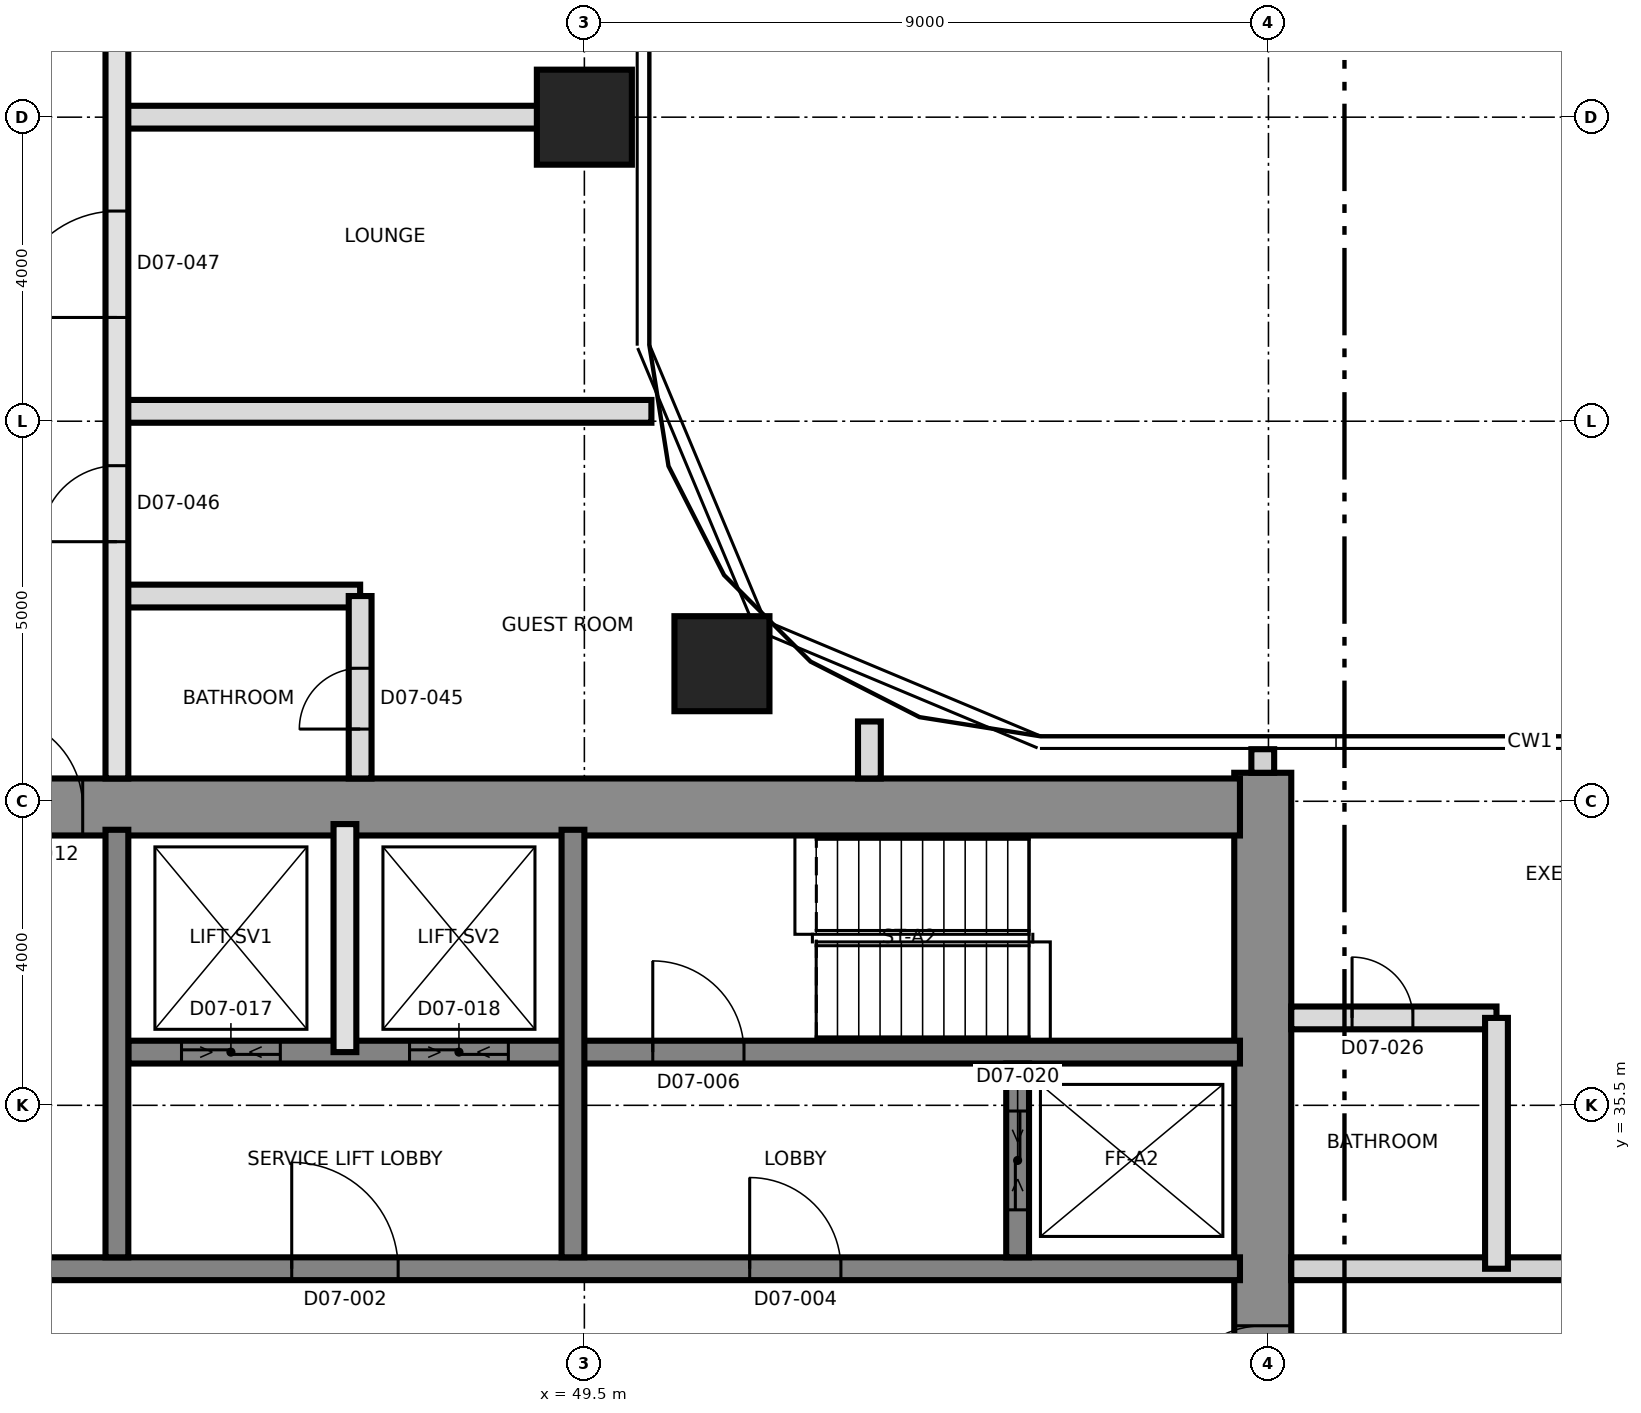
"""IFC4 building model, lengths in metres.
Left out: names, types, materials, properties, quantities, classifications, styles, units other than length and angle.
Written with IfcOpenShell. Run it as: python <this file> out.ifc"""

import sys

from ifc_helpers import new_model, si_unit, direction, frame, frame_2d, origin, origin_2d, place, context, subcontext, project, spatial, rectangle, extrude, element, fill, save


model = new_model("IFC4")
c1 = context("Model", 3, precision=1e-05, world=origin(), true_north=direction((0.0, 1.0)))
c2 = subcontext(c1, "Body", "Model", "MODEL_VIEW")
j1 = project(units=[si_unit("LENGTHUNIT", "METRE"), si_unit("PLANEANGLEUNIT", "RADIAN")], contexts=[c1])
p1 = place(None, origin())
s1 = spatial("IfcSite", under=j1, at=p1, CompositionType="ELEMENT")
p2 = place(p1, origin())
s2 = spatial("IfcBuilding", under=s1, at=p2, CompositionType="ELEMENT")
p3 = place(p2, frame((0.0, 0.0, 90.8)))
s3 = spatial("IfcBuildingStorey", under=s2, at=p3, CompositionType="ELEMENT", Elevation=90.8)
p4 = place(p3, frame((58.425, 21.125, 0.0), z_axis=(0.0, 0.0, 1.0), x_axis=(0.0, 1.0, 0.0)))
e1 = element("IfcWall", 1, at=p4, inside=s3, PredefinedType="SHEAR", context=c2, shape_type="SweptSolid", body=[
    extrude(rectangle(XDim=18.75, YDim=0.75, at=frame_2d((9.375, 0.0))), origin(), (0.0, 0.0, 1.0), 3.7),
])
p5 = place(p4, frame((10.275, 0.0, 0.0)))
e2 = element("IfcOpeningElement", 2, at=p5, cuts=e1, PredefinedType="OPENING", context=c2, shape_type="SweptSolid", body=[
    extrude(rectangle(XDim=1.2, YDim=2.1, at=frame_2d((0.6, 1.05))), frame((0.0, 0.385, 0.0), z_axis=(0.0, -1.0, 0.0), x_axis=(1.0, 0.0, 0.0)), (0.0, 0.0, 1.0), 0.77),
])
p6 = place(p3, frame((31.125, 39.425, 0.0), z_axis=(0.0, 0.0, 1.0), x_axis=(1.0, 0.0, 0.0)))
e3 = element("IfcWall", 3, at=p6, inside=s3, PredefinedType="SHEAR", context=c2, shape_type="SweptSolid", body=[
    extrude(rectangle(XDim=27.0, YDim=0.75, at=frame_2d((13.5, 0.0))), origin(), (0.0, 0.0, 1.0), 3.7),
])
p7 = place(p6, frame((10.575, 0.0, 0.0)))
e4 = element("IfcOpeningElement", 4, at=p7, cuts=e3, PredefinedType="OPENING", context=c2, shape_type="SweptSolid", body=[
    extrude(rectangle(XDim=1.2, YDim=2.1, at=frame_2d((0.6, 1.05))), frame((0.0, 0.385, 0.0), z_axis=(0.0, -1.0, 0.0), x_axis=(1.0, 0.0, 0.0)), (0.0, 0.0, 1.0), 0.77),
])
p8 = place(p3, frame((31.875, 33.35, 0.0), z_axis=(0.0, 0.0, 1.0), x_axis=(1.0, 0.0, 0.0)))
e5 = element("IfcWall", 5, at=p8, inside=s3, PredefinedType="SHEAR", context=c2, shape_type="SweptSolid", body=[
    extrude(rectangle(XDim=26.25, YDim=0.3, at=frame_2d((13.125, 0.0))), origin(), (0.0, 0.0, 1.0), 3.7),
])
p9 = place(p8, frame((13.775, 0.0, 0.0)))
e6 = element("IfcOpeningElement", 6, at=p9, cuts=e5, PredefinedType="OPENING", context=c2, shape_type="SweptSolid", body=[
    extrude(rectangle(XDim=1.4, YDim=2.1, at=frame_2d((0.7, 1.05))), frame((0.0, 0.16, 0.0), z_axis=(0.0, -1.0, 0.0), x_axis=(1.0, 0.0, 0.0)), (0.0, 0.0, 1.0), 0.32),
])
p10 = place(p8, frame((5.25, 0.0, 0.0)))
e7 = element("IfcOpeningElement", 7, at=p10, cuts=e5, PredefinedType="OPENING", context=c2, shape_type="SweptSolid", body=[
    extrude(rectangle(XDim=1.2, YDim=2.1, at=frame_2d((0.6, 1.05))), frame((0.0, 0.16, 0.0), z_axis=(0.0, -1.0, 0.0), x_axis=(1.0, 0.0, 0.0)), (0.0, 0.0, 1.0), 0.32),
])
p11 = place(p8, frame((19.8, 0.0, 0.0)))
e8 = element("IfcOpeningElement", 8, at=p11, cuts=e5, PredefinedType="OPENING", context=c2, shape_type="SweptSolid", body=[
    extrude(rectangle(XDim=1.2, YDim=2.1, at=frame_2d((0.6, 1.05))), frame((0.0, 0.16, 0.0), z_axis=(0.0, -1.0, 0.0), x_axis=(1.0, 0.0, 0.0)), (0.0, 0.0, 1.0), 0.32),
])
p12 = place(p3, frame((43.5, 36.2, 0.0), z_axis=(0.0, 0.0, 1.0), x_axis=(1.0, 0.0, 0.0)))
e9 = element("IfcWall", 9, at=p12, inside=s3, PredefinedType="SHEAR", context=c2, shape_type="SweptSolid", body=[
    extrude(rectangle(XDim=14.625, YDim=0.3, at=frame_2d((7.312, 0.0))), origin(), (0.0, 0.0, 1.0), 3.7),
])
p13 = place(p12, frame((6.9, 0.0, 0.0)))
e10 = element("IfcOpeningElement", 10, at=p13, cuts=e9, PredefinedType="OPENING", context=c2, shape_type="SweptSolid", body=[
    extrude(rectangle(XDim=1.2, YDim=2.1, at=frame_2d((0.6, 1.05))), frame((0.0, 0.16, 0.0), z_axis=(0.0, -1.0, 0.0), x_axis=(1.0, 0.0, 0.0)), (0.0, 0.0, 1.0), 0.32),
])
p14 = place(p12, frame((0.7, 0.0, 0.0)))
e11 = element("IfcOpeningElement", 11, at=p14, cuts=e9, PredefinedType="OPENING", context=c2, shape_type="SweptSolid", body=[
    extrude(rectangle(XDim=1.3, YDim=2.4, at=frame_2d((0.65, 1.2))), frame((0.0, 0.16, 0.0), z_axis=(0.0, -1.0, 0.0), x_axis=(1.0, 0.0, 0.0)), (0.0, 0.0, 1.0), 0.32),
])
p15 = place(p12, frame((3.7, 0.0, 0.0)))
e12 = element("IfcOpeningElement", 12, at=p15, cuts=e9, PredefinedType="OPENING", context=c2, shape_type="SweptSolid", body=[
    extrude(rectangle(XDim=1.3, YDim=2.4, at=frame_2d((0.65, 1.2))), frame((0.0, 0.16, 0.0), z_axis=(0.0, -1.0, 0.0), x_axis=(1.0, 0.0, 0.0)), (0.0, 0.0, 1.0), 0.32),
])
for number, where, z_axis, x_axis in (
    (13, (43.35, 33.5, 0.0), (0.0, 0.0, 1.0), (0.0, 1.0, 0.0)),
    (14, (49.35, 33.5, 0.0), (0.0, 0.0, 1.0), (0.0, 1.0, 0.0)),
):
    element("IfcWall", number, at=place(p3, frame(where, z_axis=z_axis, x_axis=x_axis)), inside=s3, PredefinedType="SHEAR", context=c2, shape_type="SweptSolid", body=[
        extrude(rectangle(XDim=5.625, YDim=0.3, at=frame_2d((2.812, 0.0))), origin(), (0.0, 0.0, 1.0), 3.7),
    ])
p16 = place(p3, frame((55.2, 33.5, 0.0), z_axis=(0.0, 0.0, 1.0), x_axis=(0.0, 1.0, 0.0)))
e15 = element("IfcWall", 15, at=p16, inside=s3, PredefinedType="SHEAR", context=c2, shape_type="SweptSolid", body=[
    extrude(rectangle(XDim=2.55, YDim=0.3, at=frame_2d((1.275, 0.0))), origin(), (0.0, 0.0, 1.0), 3.7),
])
p17 = place(p16, frame((0.625, 0.0, 0.0)))
e16 = element("IfcOpeningElement", 16, at=p17, cuts=e15, PredefinedType="OPENING", context=c2, shape_type="SweptSolid", body=[
    extrude(rectangle(XDim=1.3, YDim=2.4, at=frame_2d((0.65, 1.2))), frame((0.0, 0.16, 0.0), z_axis=(0.0, -1.0, 0.0), x_axis=(1.0, 0.0, 0.0)), (0.0, 0.0, 1.0), 0.32),
])
for number, where, z_axis, x_axis in (
    (17, (51.31, 41.31, 0.0), (0.0, 0.0, 1.0), (1.0, 0.0, 0.0)),
    (18, (49.5, 48.5, 0.0), (0.0, 0.0, 1.0), (1.0, 0.0, 0.0)),
):
    element("IfcColumn", number, at=place(p3, frame(where, z_axis=z_axis, x_axis=x_axis)), inside=s3, PredefinedType="COLUMN", context=c2, shape_type="SweptSolid", body=[
        extrude(rectangle(XDim=1.25, YDim=1.25, at=origin_2d()), origin(), (0.0, 0.0, 1.0), 3.7),
    ])
p18 = place(p3, frame((46.35, 36.2, 0.0), z_axis=(0.0, 0.0, 1.0), x_axis=(0.0, 1.0, 0.0)))
e19 = element("IfcWall", 19, at=p18, inside=s3, PredefinedType="SOLIDWALL", context=c2, shape_type="SweptSolid", body=[
    extrude(rectangle(XDim=3.0, YDim=0.3, at=frame_2d((1.5, 0.0))), origin(), (0.0, 0.0, 1.0), 3.4),
])
p19 = place(p3, frame((58.8, 33.35, 0.0), z_axis=(0.0, 0.0, 1.0), x_axis=(1.0, 0.0, 0.0)))
e20 = element("IfcWall", 20, at=p19, inside=s3, PredefinedType="PARTITIONING", context=c2, shape_type="SweptSolid", body=[
    extrude(rectangle(XDim=26.53, YDim=0.3, at=frame_2d((13.265, 0.0))), origin(), (0.0, 0.0, 1.0), 3.4),
])
p20 = place(p19, frame((3.7, 0.0, 0.0)))
e21 = element("IfcOpeningElement", 21, at=p20, cuts=e20, PredefinedType="OPENING", context=c2, shape_type="SweptSolid", body=[
    extrude(rectangle(XDim=1.0, YDim=2.4, at=frame_2d((0.5, 1.2))), frame((0.0, 0.16, 0.0), z_axis=(0.0, -1.0, 0.0), x_axis=(1.0, 0.0, 0.0)), (0.0, 0.0, 1.0), 0.32),
])
p21 = place(p19, frame((9.85, 0.0, 0.0)))
e22 = element("IfcOpeningElement", 22, at=p21, cuts=e20, PredefinedType="OPENING", context=c2, shape_type="SweptSolid", body=[
    extrude(rectangle(XDim=1.0, YDim=2.1, at=frame_2d((0.5, 1.05))), frame((0.0, 0.16, 0.0), z_axis=(0.0, -1.0, 0.0), x_axis=(1.0, 0.0, 0.0)), (0.0, 0.0, 1.0), 0.32),
])
p22 = place(p19, frame((15.7, 0.0, 0.0)))
e23 = element("IfcOpeningElement", 23, at=p22, cuts=e20, PredefinedType="OPENING", context=c2, shape_type="SweptSolid", body=[
    extrude(rectangle(XDim=1.0, YDim=2.1, at=frame_2d((0.5, 1.05))), frame((0.0, 0.16, 0.0), z_axis=(0.0, -1.0, 0.0), x_axis=(1.0, 0.0, 0.0)), (0.0, 0.0, 1.0), 0.32),
])
p23 = place(p19, frame((21.7, 0.0, 0.0)))
e24 = element("IfcOpeningElement", 24, at=p23, cuts=e20, PredefinedType="OPENING", context=c2, shape_type="SweptSolid", body=[
    extrude(rectangle(XDim=1.0, YDim=2.4, at=frame_2d((0.5, 1.2))), frame((0.0, 0.16, 0.0), z_axis=(0.0, -1.0, 0.0), x_axis=(1.0, 0.0, 0.0)), (0.0, 0.0, 1.0), 0.32),
])
p24 = place(p3, frame((58.8, 36.65, 0.0), z_axis=(0.0, 0.0, 1.0), x_axis=(1.0, 0.0, 0.0)))
e25 = element("IfcWall", 25, at=p24, inside=s3, PredefinedType="PARTITIONING", context=c2, shape_type="SweptSolid", body=[
    extrude(rectangle(XDim=2.7, YDim=0.3, at=frame_2d((1.35, 0.0))), origin(), (0.0, 0.0, 1.0), 3.4),
])
p25 = place(p24, frame((0.8, 0.0, 0.0)))
e26 = element("IfcOpeningElement", 26, at=p25, cuts=e25, PredefinedType="OPENING", context=c2, shape_type="SweptSolid", body=[
    extrude(rectangle(XDim=0.8, YDim=2.1, at=frame_2d((0.4, 1.05))), frame((0.0, 0.16, 0.0), z_axis=(0.0, -1.0, 0.0), x_axis=(1.0, 0.0, 0.0)), (0.0, 0.0, 1.0), 0.32),
])
p26 = place(p3, frame((43.35, 42.2, 0.0), z_axis=(0.0, 0.0, 1.0), x_axis=(1.0, 0.0, 0.0)))
e27 = element("IfcWall", 27, at=p26, inside=s3, PredefinedType="PARTITIONING", context=c2, shape_type="SweptSolid", body=[
    extrude(rectangle(XDim=3.2, YDim=0.3, at=frame_2d((1.6, 0.0))), origin(), (0.0, 0.0, 1.0), 3.4),
])
p27 = place(p3, frame((43.35, 44.63, 0.0), z_axis=(0.0, 0.0, 1.0), x_axis=(1.0, 0.0, 0.0)))
e28 = element("IfcWall", 28, at=p27, inside=s3, PredefinedType="PARTITIONING", context=c2, shape_type="SweptSolid", body=[
    extrude(rectangle(XDim=7.032, YDim=0.3, at=frame_2d((3.516, 0.0))), origin(), (0.0, 0.0, 1.0), 3.4),
])
p28 = place(p3, frame((43.35, 48.5, 0.0), z_axis=(0.0, 0.0, 1.0), x_axis=(1.0, 0.0, 0.0)))
e29 = element("IfcWall", 29, at=p28, inside=s3, PredefinedType="PARTITIONING", context=c2, shape_type="SweptSolid", body=[
    extrude(rectangle(XDim=6.655, YDim=0.3, at=frame_2d((3.327, 0.0))), origin(), (0.0, 0.0, 1.0), 3.4),
])
p29 = place(p3, frame((43.35, 39.8, 0.0), z_axis=(0.0, 0.0, 1.0), x_axis=(0.0, 1.0, 0.0)))
e30 = element("IfcWall", 30, at=p29, inside=s3, PredefinedType="SOLIDWALL", context=c2, shape_type="SweptSolid", body=[
    extrude(rectangle(XDim=26.0, YDim=0.3, at=frame_2d((13.0, 0.0))), origin(), (0.0, 0.0, 1.0), 3.4),
])
p30 = place(p29, frame((3.115, 0.0, 0.0)))
e31 = element("IfcOpeningElement", 31, at=p30, cuts=e30, PredefinedType="OPENING", context=c2, shape_type="SweptSolid", body=[
    extrude(rectangle(XDim=1.0, YDim=2.1, at=frame_2d((0.5, 1.05))), frame((0.0, 0.16, 0.0), z_axis=(0.0, -1.0, 0.0), x_axis=(1.0, 0.0, 0.0)), (0.0, 0.0, 1.0), 0.32),
])
p31 = place(p29, frame((6.065, 0.0, 0.0)))
e32 = element("IfcOpeningElement", 32, at=p31, cuts=e30, PredefinedType="OPENING", context=c2, shape_type="SweptSolid", body=[
    extrude(rectangle(XDim=1.4, YDim=2.1, at=frame_2d((0.7, 1.05))), frame((0.0, 0.16, 0.0), z_axis=(0.0, -1.0, 0.0), x_axis=(1.0, 0.0, 0.0)), (0.0, 0.0, 1.0), 0.32),
])
p32 = place(p29, frame((9.835, 0.0, 0.0)))
e33 = element("IfcOpeningElement", 33, at=p32, cuts=e30, PredefinedType="OPENING", context=c2, shape_type="SweptSolid", body=[
    extrude(rectangle(XDim=1.2, YDim=2.1, at=frame_2d((0.6, 1.05))), frame((0.0, 0.16, 0.0), z_axis=(0.0, -1.0, 0.0), x_axis=(1.0, 0.0, 0.0)), (0.0, 0.0, 1.0), 0.32),
])
p33 = place(p29, frame((13.085, 0.0, 0.0)))
e34 = element("IfcOpeningElement", 34, at=p33, cuts=e30, PredefinedType="OPENING", context=c2, shape_type="SweptSolid", body=[
    extrude(rectangle(XDim=1.0, YDim=2.1, at=frame_2d((0.5, 1.05))), frame((0.0, 0.16, 0.0), z_axis=(0.0, -1.0, 0.0), x_axis=(1.0, 0.0, 0.0)), (0.0, 0.0, 1.0), 0.32),
])
p34 = place(p29, frame((21.25, 0.0, 0.0)))
e35 = element("IfcOpeningElement", 35, at=p34, cuts=e30, PredefinedType="OPENING", context=c2, shape_type="SweptSolid", body=[
    extrude(rectangle(XDim=1.0, YDim=2.4, at=frame_2d((0.5, 1.2))), frame((0.0, 0.16, 0.0), z_axis=(0.0, -1.0, 0.0), x_axis=(1.0, 0.0, 0.0)), (0.0, 0.0, 1.0), 0.32),
])
p35 = place(p3, frame((46.55, 39.8, 0.0), z_axis=(0.0, 0.0, 1.0), x_axis=(0.0, 1.0, 0.0)))
e36 = element("IfcWall", 36, at=p35, inside=s3, PredefinedType="PARTITIONING", context=c2, shape_type="SweptSolid", body=[
    extrude(rectangle(XDim=2.4, YDim=0.3, at=frame_2d((1.2, 0.0))), origin(), (0.0, 0.0, 1.0), 3.4),
])
p36 = place(p35, frame((0.65, 0.0, 0.0)))
e37 = element("IfcOpeningElement", 37, at=p36, cuts=e36, PredefinedType="OPENING", context=c2, shape_type="SweptSolid", body=[
    extrude(rectangle(XDim=0.8, YDim=2.1, at=frame_2d((0.4, 1.05))), frame((0.0, 0.16, 0.0), z_axis=(0.0, -1.0, 0.0), x_axis=(1.0, 0.0, 0.0)), (0.0, 0.0, 1.0), 0.32),
])
p37 = place(p3, frame((53.25, 39.8, 0.0), z_axis=(0.0, 0.0, 1.0), x_axis=(0.0, 1.0, 0.0)))
e38 = element("IfcWall", 38, at=p37, inside=s3, PredefinedType="PARTITIONING", context=c2, shape_type="SweptSolid", body=[
    extrude(rectangle(XDim=0.75, YDim=0.3, at=frame_2d((0.375, 0.0))), origin(), (0.0, 0.0, 1.0), 3.4),
])
p38 = place(p3, frame((61.5, 33.35, 0.0), z_axis=(0.0, 0.0, 1.0), x_axis=(0.0, 1.0, 0.0)))
e39 = element("IfcWall", 39, at=p38, inside=s3, PredefinedType="PARTITIONING", context=c2, shape_type="SweptSolid", body=[
    extrude(rectangle(XDim=3.3, YDim=0.3, at=frame_2d((1.65, 0.0))), origin(), (0.0, 0.0, 1.0), 3.4),
])
p39 = place(p3, frame((58.425, 39.875, 0.0), z_axis=(0.0, 0.0, 1.0), x_axis=(0.0, 1.0, 0.0)))
e40 = element("IfcWall", 40, at=p39, inside=s3, PredefinedType="PARTITIONING", context=c2, shape_type="SweptSolid", body=[
    extrude(rectangle(XDim=0.31, YDim=0.3, at=frame_2d((0.155, 0.0))), origin(), (0.0, 0.0, 1.0), 3.4),
])
p40 = place(p9, origin())
e41 = element("IfcDoor", 41, at=p40, inside=s3, OperationType="SINGLE_SWING_RIGHT", PredefinedType="DOOR", context=c2, shape_type="SweptSolid", body=[
    extrude(rectangle(XDim=1.4, YDim=2.1, at=frame_2d((0.7, 1.05))), frame((0.0, 0.025, 0.0), z_axis=(0.0, -1.0, 0.0), x_axis=(1.0, 0.0, 0.0)), (0.0, 0.0, 1.0), 0.05),
])
fill(e6, e41)
p41 = place(p11, origin())
e42 = element("IfcDoor", 42, at=p41, inside=s3, OperationType="SINGLE_SWING_RIGHT", PredefinedType="DOOR", context=c2, shape_type="SweptSolid", body=[
    extrude(rectangle(XDim=1.2, YDim=2.1, at=frame_2d((0.6, 1.05))), frame((0.0, 0.025, 0.0), z_axis=(0.0, -1.0, 0.0), x_axis=(1.0, 0.0, 0.0)), (0.0, 0.0, 1.0), 0.05),
])
fill(e8, e42)
p42 = place(p13, origin())
e43 = element("IfcDoor", 43, at=p42, inside=s3, OperationType="SINGLE_SWING_LEFT", PredefinedType="DOOR", context=c2, shape_type="SweptSolid", body=[
    extrude(rectangle(XDim=1.2, YDim=2.1, at=frame_2d((0.6, 1.05))), frame((0.0, 0.025, 0.0), z_axis=(0.0, -1.0, 0.0), x_axis=(1.0, 0.0, 0.0)), (0.0, 0.0, 1.0), 0.05),
])
fill(e10, e43)
p43 = place(p5, origin())
e44 = element("IfcDoor", 44, at=p43, inside=s3, OperationType="SINGLE_SWING_LEFT", PredefinedType="DOOR", context=c2, shape_type="SweptSolid", body=[
    extrude(rectangle(XDim=1.2, YDim=2.1, at=frame_2d((0.6, 1.05))), frame((0.0, 0.025, 0.0), z_axis=(0.0, -1.0, 0.0), x_axis=(1.0, 0.0, 0.0)), (0.0, 0.0, 1.0), 0.05),
])
fill(e2, e44)
p44 = place(p7, origin())
e45 = element("IfcDoor", 45, at=p44, inside=s3, OperationType="SINGLE_SWING_RIGHT", PredefinedType="DOOR", context=c2, shape_type="SweptSolid", body=[
    extrude(rectangle(XDim=1.2, YDim=2.1, at=frame_2d((0.6, 1.05))), frame((0.0, 0.025, 0.0), z_axis=(0.0, -1.0, 0.0), x_axis=(1.0, 0.0, 0.0)), (0.0, 0.0, 1.0), 0.05),
])
fill(e4, e45)
p45 = place(p14, origin())
e46 = element("IfcDoor", 46, at=p45, inside=s3, OperationType="SLIDING_TO_LEFT", PredefinedType="DOOR", context=c2, shape_type="SweptSolid", body=[
    extrude(rectangle(XDim=1.3, YDim=2.4, at=frame_2d((0.65, 1.2))), frame((0.0, 0.025, 0.0), z_axis=(0.0, -1.0, 0.0), x_axis=(1.0, 0.0, 0.0)), (0.0, 0.0, 1.0), 0.05),
])
fill(e11, e46)
p46 = place(p15, origin())
e47 = element("IfcDoor", 47, at=p46, inside=s3, OperationType="SLIDING_TO_LEFT", PredefinedType="DOOR", context=c2, shape_type="SweptSolid", body=[
    extrude(rectangle(XDim=1.3, YDim=2.4, at=frame_2d((0.65, 1.2))), frame((0.0, 0.025, 0.0), z_axis=(0.0, -1.0, 0.0), x_axis=(1.0, 0.0, 0.0)), (0.0, 0.0, 1.0), 0.05),
])
fill(e12, e47)
p47 = place(p17, origin())
e48 = element("IfcDoor", 48, at=p47, inside=s3, OperationType="SLIDING_TO_LEFT", PredefinedType="DOOR", context=c2, shape_type="SweptSolid", body=[
    extrude(rectangle(XDim=1.3, YDim=2.4, at=frame_2d((0.65, 1.2))), frame((0.0, 0.025, 0.0), z_axis=(0.0, -1.0, 0.0), x_axis=(1.0, 0.0, 0.0)), (0.0, 0.0, 1.0), 0.05),
])
fill(e16, e48)
p48 = place(p25, origin())
e49 = element("IfcDoor", 49, at=p48, inside=s3, OperationType="SINGLE_SWING_LEFT", PredefinedType="DOOR", context=c2, shape_type="SweptSolid", body=[
    extrude(rectangle(XDim=0.8, YDim=2.1, at=frame_2d((0.4, 1.05))), frame((0.0, 0.025, 0.0), z_axis=(0.0, -1.0, 0.0), x_axis=(1.0, 0.0, 0.0)), (0.0, 0.0, 1.0), 0.05),
])
fill(e26, e49)
p49 = place(p36, origin())
e50 = element("IfcDoor", 50, at=p49, inside=s3, OperationType="SINGLE_SWING_RIGHT", PredefinedType="DOOR", context=c2, shape_type="SweptSolid", body=[
    extrude(rectangle(XDim=0.8, YDim=2.1, at=frame_2d((0.4, 1.05))), frame((0.0, 0.025, 0.0), z_axis=(0.0, -1.0, 0.0), x_axis=(1.0, 0.0, 0.0)), (0.0, 0.0, 1.0), 0.05),
])
fill(e37, e50)
p50 = place(p30, origin())
e51 = element("IfcDoor", 51, at=p50, inside=s3, OperationType="SINGLE_SWING_LEFT", PredefinedType="DOOR", context=c2, shape_type="SweptSolid", body=[
    extrude(rectangle(XDim=1.0, YDim=2.1, at=frame_2d((0.5, 1.05))), frame((0.0, 0.025, 0.0), z_axis=(0.0, -1.0, 0.0), x_axis=(1.0, 0.0, 0.0)), (0.0, 0.0, 1.0), 0.05),
])
fill(e31, e51)
p51 = place(p31, origin())
e52 = element("IfcDoor", 52, at=p51, inside=s3, OperationType="SINGLE_SWING_LEFT", PredefinedType="DOOR", context=c2, shape_type="SweptSolid", body=[
    extrude(rectangle(XDim=1.4, YDim=2.1, at=frame_2d((0.7, 1.05))), frame((0.0, 0.025, 0.0), z_axis=(0.0, -1.0, 0.0), x_axis=(1.0, 0.0, 0.0)), (0.0, 0.0, 1.0), 0.05),
])
fill(e32, e52)
save(model, sys.argv[1])
